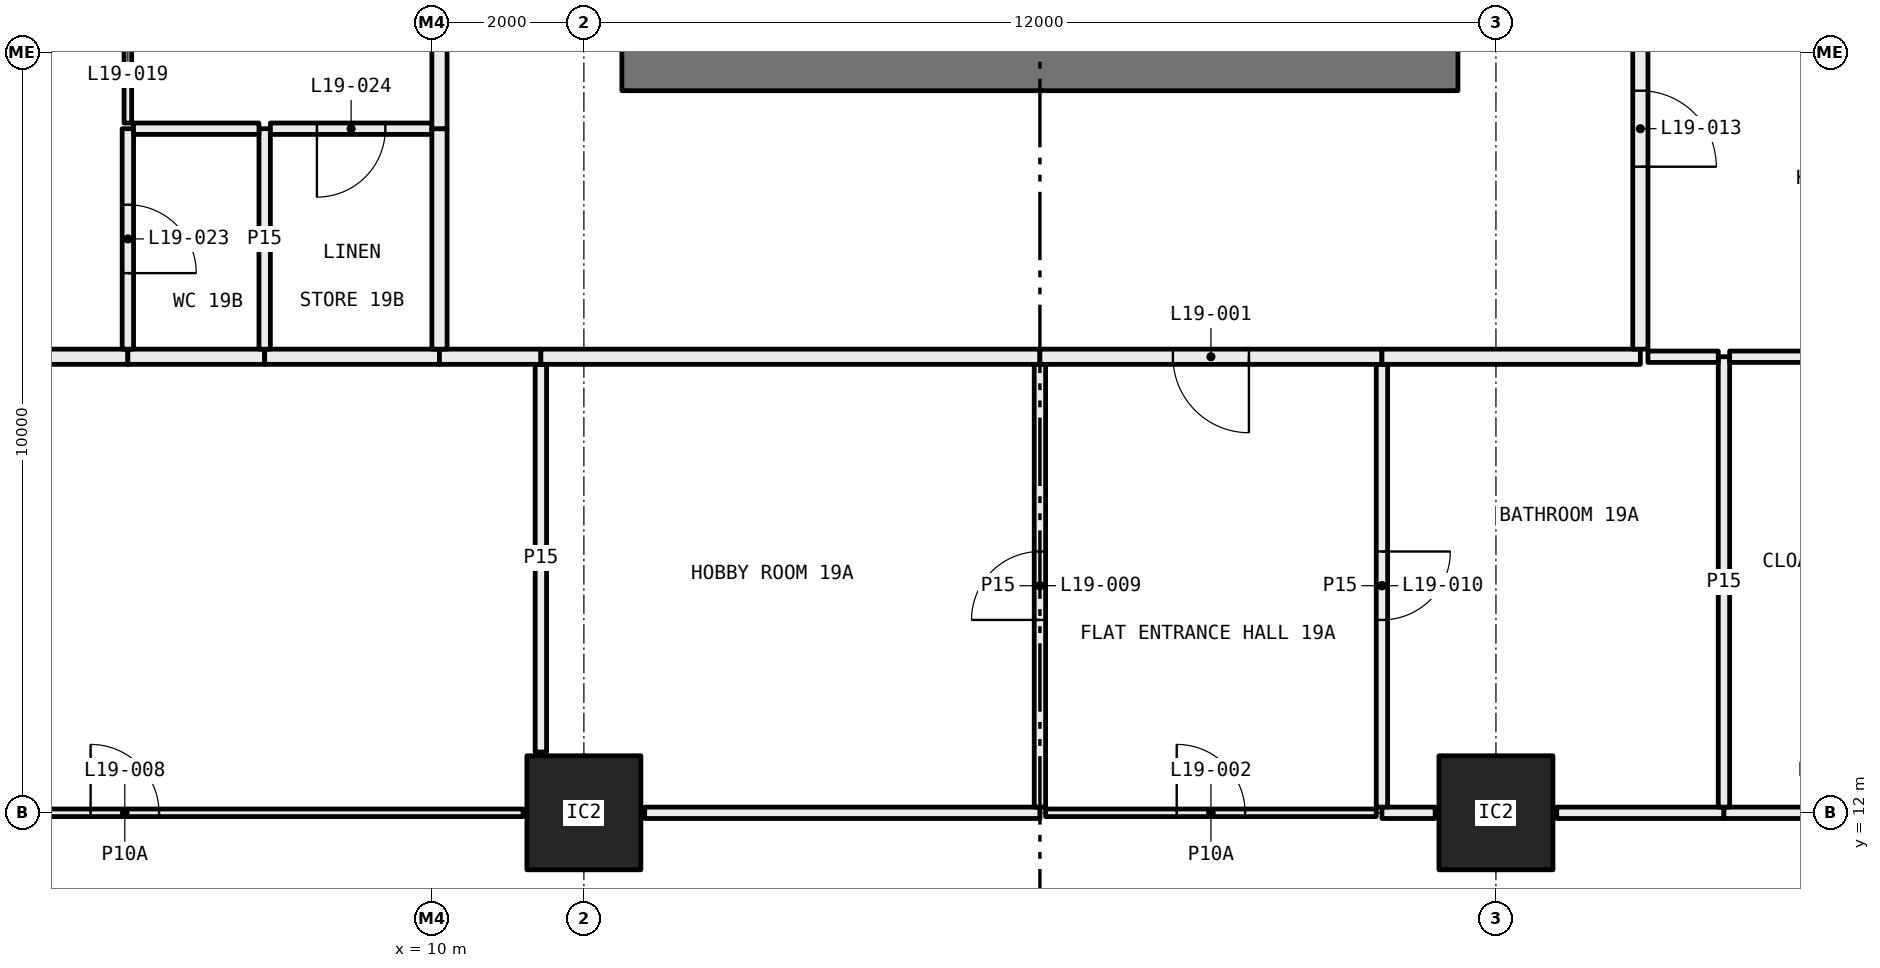
"""IFC4 building model, lengths in metres.
Left out: names, types, materials, properties, quantities, classifications, styles, units other than length and angle.
Written with IfcOpenShell. Run it as: python <this file> out.ifc"""

import sys

from ifc_helpers import new_model, si_unit, direction, frame, frame_2d, origin, origin_2d, place, context, subcontext, project, spatial, rectangle, hollow_rectangle, extrude, element, fill, save


model = new_model("IFC4")
c1 = context("Model", 3, precision=1e-05, world=origin(), true_north=direction((0.0, 1.0)))
c2 = subcontext(c1, "Body", "Model", "MODEL_VIEW")
j1 = project(units=[si_unit("LENGTHUNIT", "METRE"), si_unit("PLANEANGLEUNIT", "RADIAN")], contexts=[c1])
p1 = place(None, origin())
s1 = spatial("IfcSite", under=j1, at=p1, CompositionType="ELEMENT")
p2 = place(p1, origin())
s2 = spatial("IfcBuilding", under=s1, at=p2, CompositionType="ELEMENT")
p3 = place(p2, frame((0.0, 0.0, 78.3)))
s3 = spatial("IfcBuildingStorey", under=s2, at=p3, CompositionType="ELEMENT", Elevation=78.3)
for number, where, z_axis, x_axis in (
    (1, (12.0, 12.0, 0.0), (0.0, 0.0, 1.0), (1.0, 0.0, 0.0)),
    (2, (24.0, 12.0, 0.0), (0.0, 0.0, 1.0), (1.0, 0.0, 0.0)),
):
    element("IfcColumn", number, at=place(p3, frame(where, z_axis=z_axis, x_axis=x_axis)), inside=s3, PredefinedType="COLUMN", context=c2, shape_type="SweptSolid", body=[
        extrude(hollow_rectangle(XDim=1.5, YDim=1.5, WallThickness=0.065, at=origin_2d()), origin(), (0.0, 0.0, 1.0), 3.05),
    ])
p4 = place(p3, frame((11.2, 12.0, 0.0), z_axis=(0.0, 0.0, 1.0), x_axis=(-1.0, 0.0, 0.0)))
e3 = element("IfcWall", 3, at=p4, inside=s3, PredefinedType="PARTITIONING", context=c2, shape_type="SweptSolid", body=[
    extrude(rectangle(XDim=10.48, YDim=0.1, at=frame_2d((5.24, 0.0))), origin(), (0.0, 0.0, 1.0), 2.45),
])
p5 = place(p4, frame((4.79, 0.0, 0.0)))
e4 = element("IfcOpeningElement", 4, at=p5, cuts=e3, PredefinedType="OPENING", context=c2, shape_type="SweptSolid", body=[
    extrude(rectangle(XDim=0.9, YDim=2.1, at=frame_2d((0.45, 1.05))), frame((0.0, 0.06, 0.0), z_axis=(0.0, -1.0, 0.0), x_axis=(1.0, 0.0, 0.0)), (0.0, 0.0, 1.0), 0.12),
])
p6 = place(p3, frame((18.0, 12.0, 0.0), z_axis=(0.0, 0.0, 1.0), x_axis=(-1.0, 0.0, 0.0)))
e5 = element("IfcWall", 5, at=p6, inside=s3, PredefinedType="PARTITIONING", context=c2, shape_type="SweptSolid", body=[
    extrude(rectangle(XDim=5.2, YDim=0.15, at=frame_2d((2.6, 0.0))), origin(), (0.0, 0.0, 1.0), 2.45),
])
p7 = place(p3, frame((22.425, 12.0, 0.0), z_axis=(0.0, 0.0, 1.0), x_axis=(-1.0, 0.0, 0.0)))
e6 = element("IfcWall", 6, at=p7, inside=s3, PredefinedType="PARTITIONING", context=c2, shape_type="SweptSolid", body=[
    extrude(rectangle(XDim=4.35, YDim=0.1, at=frame_2d((2.175, 0.0))), origin(), (0.0, 0.0, 1.0), 2.45),
])
p8 = place(p7, frame((1.725, 0.0, 0.0)))
e7 = element("IfcOpeningElement", 7, at=p8, cuts=e6, PredefinedType="OPENING", context=c2, shape_type="SweptSolid", body=[
    extrude(rectangle(XDim=0.9, YDim=2.1, at=frame_2d((0.45, 1.05))), frame((0.0, 0.06, 0.0), z_axis=(0.0, -1.0, 0.0), x_axis=(1.0, 0.0, 0.0)), (0.0, 0.0, 1.0), 0.12),
])
p9 = place(p3, frame((23.2, 12.0, 0.0), z_axis=(0.0, 0.0, 1.0), x_axis=(-1.0, 0.0, 0.0)))
e8 = element("IfcWall", 8, at=p9, inside=s3, PredefinedType="PARTITIONING", context=c2, shape_type="SweptSolid", body=[
    extrude(rectangle(XDim=0.7, YDim=0.15, at=frame_2d((0.35, 0.0))), origin(), (0.0, 0.0, 1.0), 2.45),
])
p10 = place(p3, frame((27.0, 12.0, 0.0), z_axis=(0.0, 0.0, 1.0), x_axis=(-1.0, 0.0, 0.0)))
e9 = element("IfcWall", 9, at=p10, inside=s3, PredefinedType="PARTITIONING", context=c2, shape_type="SweptSolid", body=[
    extrude(rectangle(XDim=2.2, YDim=0.15, at=frame_2d((1.1, 0.0))), origin(), (0.0, 0.0, 1.0), 2.45),
])
p11 = place(p3, frame((30.0, 12.0, 0.0), z_axis=(0.0, 0.0, 1.0), x_axis=(-1.0, 0.0, 0.0)))
e10 = element("IfcWall", 10, at=p11, inside=s3, PredefinedType="PARTITIONING", context=c2, shape_type="SweptSolid", body=[
    extrude(rectangle(XDim=3.0, YDim=0.15, at=frame_2d((1.5, 0.0))), origin(), (0.0, 0.0, 1.0), 2.45),
])
p12 = place(p11, frame((1.05, 0.0, 0.0)))
e11 = element("IfcOpeningElement", 11, at=p12, cuts=e10, PredefinedType="OPENING", context=c2, shape_type="SweptSolid", body=[
    extrude(rectangle(XDim=0.9, YDim=2.1, at=frame_2d((0.45, 1.05))), frame((0.0, 0.085, 0.0), z_axis=(0.0, -1.0, 0.0), x_axis=(1.0, 0.0, 0.0)), (0.0, 0.0, 1.0), 0.17),
])
p13 = place(p3, frame((11.434, 12.8, 0.0), z_axis=(0.0, 0.0, 1.0), x_axis=(0.0, 1.0, 0.0)))
e12 = element("IfcWall", 12, at=p13, inside=s3, PredefinedType="PARTITIONING", context=c2, shape_type="SweptSolid", body=[
    extrude(rectangle(XDim=5.1, YDim=0.15, at=frame_2d((2.55, 0.0))), origin(), (0.0, 0.0, 1.0), 3.05),
])
p14 = place(p3, frame((6.0, 18.0, 0.0), z_axis=(0.0, 0.0, 1.0), x_axis=(-1.0, 0.0, 0.0)))
e13 = element("IfcWall", 13, at=p14, inside=s3, PredefinedType="PARTITIONING", context=c2, shape_type="SweptSolid", body=[
    extrude(rectangle(XDim=5.28, YDim=0.2, at=frame_2d((2.64, 0.0))), origin(), (0.0, 0.0, 1.0), 3.05),
])
p15 = place(p3, frame((7.8, 18.0, 0.0), z_axis=(0.0, 0.0, 1.0), x_axis=(-1.0, 0.0, 0.0)))
e14 = element("IfcWall", 14, at=p15, inside=s3, PredefinedType="PARTITIONING", context=c2, shape_type="SweptSolid", body=[
    extrude(rectangle(XDim=1.8, YDim=0.2, at=frame_2d((0.9, 0.0))), origin(), (0.0, 0.0, 1.0), 3.05),
])
p16 = place(p3, frame((10.1, 18.0, 0.0), z_axis=(0.0, 0.0, 1.0), x_axis=(-1.0, 0.0, 0.0)))
e15 = element("IfcWall", 15, at=p16, inside=s3, PredefinedType="PARTITIONING", context=c2, shape_type="SweptSolid", body=[
    extrude(rectangle(XDim=2.3, YDim=0.2, at=frame_2d((1.15, 0.0))), origin(), (0.0, 0.0, 1.0), 3.05),
])
p17 = place(p3, frame((11.434, 18.0, 0.0), z_axis=(0.0, 0.0, 1.0), x_axis=(-1.0, 0.0, 0.0)))
e16 = element("IfcWall", 16, at=p17, inside=s3, PredefinedType="PARTITIONING", context=c2, shape_type="SweptSolid", body=[
    extrude(rectangle(XDim=1.334, YDim=0.2, at=frame_2d((0.667, 0.0))), origin(), (0.0, 0.0, 1.0), 3.05),
])
p18 = place(p3, frame((18.0, 12.075, 0.0), z_axis=(0.0, 0.0, 1.0), x_axis=(0.0, 1.0, 0.0)))
e17 = element("IfcWall", 17, at=p18, inside=s3, PredefinedType="PARTITIONING", context=c2, shape_type="SweptSolid", body=[
    extrude(rectangle(XDim=5.825, YDim=0.15, at=frame_2d((2.913, 0.0))), origin(), (0.0, 0.0, 1.0), 2.45),
])
p19 = place(p18, frame((2.462, 0.0, 0.0)))
e18 = element("IfcOpeningElement", 18, at=p19, cuts=e17, PredefinedType="OPENING", context=c2, shape_type="SweptSolid", body=[
    extrude(rectangle(XDim=0.9, YDim=2.1, at=frame_2d((0.45, 1.05))), frame((0.0, 0.085, 0.0), z_axis=(0.0, -1.0, 0.0), x_axis=(1.0, 0.0, 0.0)), (0.0, 0.0, 1.0), 0.17),
])
p20 = place(p3, frame((18.0, 18.0, 0.0), z_axis=(0.0, 0.0, 1.0), x_axis=(-1.0, 0.0, 0.0)))
e19 = element("IfcWall", 19, at=p20, inside=s3, PredefinedType="PARTITIONING", context=c2, shape_type="SweptSolid", body=[
    extrude(rectangle(XDim=6.566, YDim=0.2, at=frame_2d((3.283, 0.0))), origin(), (0.0, 0.0, 1.0), 3.05),
])
p21 = place(p3, frame((22.5, 12.075, 0.0), z_axis=(0.0, 0.0, 1.0), x_axis=(0.0, 1.0, 0.0)))
e20 = element("IfcWall", 20, at=p21, inside=s3, PredefinedType="PARTITIONING", context=c2, shape_type="SweptSolid", body=[
    extrude(rectangle(XDim=5.825, YDim=0.15, at=frame_2d((2.913, 0.0))), origin(), (0.0, 0.0, 1.0), 2.45),
])
p22 = place(p21, frame((2.462, 0.0, 0.0)))
e21 = element("IfcOpeningElement", 21, at=p22, cuts=e20, PredefinedType="OPENING", context=c2, shape_type="SweptSolid", body=[
    extrude(rectangle(XDim=0.9, YDim=2.1, at=frame_2d((0.45, 1.05))), frame((0.0, 0.085, 0.0), z_axis=(0.0, -1.0, 0.0), x_axis=(1.0, 0.0, 0.0)), (0.0, 0.0, 1.0), 0.17),
])
p23 = place(p3, frame((22.5, 18.0, 0.0), z_axis=(0.0, 0.0, 1.0), x_axis=(-1.0, 0.0, 0.0)))
e22 = element("IfcWall", 22, at=p23, inside=s3, PredefinedType="PARTITIONING", context=c2, shape_type="SweptSolid", body=[
    extrude(rectangle(XDim=4.5, YDim=0.2, at=frame_2d((2.25, 0.0))), origin(), (0.0, 0.0, 1.0), 3.05),
])
p24 = place(p23, frame((1.75, 0.0, 0.0)))
e23 = element("IfcOpeningElement", 23, at=p24, cuts=e22, PredefinedType="OPENING", context=c2, shape_type="SweptSolid", body=[
    extrude(rectangle(XDim=1.0, YDim=2.1, at=frame_2d((0.5, 1.05))), frame((0.0, 0.11, 0.0), z_axis=(0.0, -1.0, 0.0), x_axis=(1.0, 0.0, 0.0)), (0.0, 0.0, 1.0), 0.22),
])
p25 = place(p3, frame((27.0, 12.075, 0.0), z_axis=(0.0, 0.0, 1.0), x_axis=(0.0, 1.0, 0.0)))
e24 = element("IfcWall", 24, at=p25, inside=s3, PredefinedType="PARTITIONING", context=c2, shape_type="SweptSolid", body=[
    extrude(rectangle(XDim=5.925, YDim=0.15, at=frame_2d((2.962, 0.0))), origin(), (0.0, 0.0, 1.0), 2.45),
])
p26 = place(p3, frame((26.925, 18.0, 0.0), z_axis=(0.0, 0.0, 1.0), x_axis=(-1.0, 0.0, 0.0)))
e25 = element("IfcWall", 25, at=p26, inside=s3, PredefinedType="PARTITIONING", context=c2, shape_type="SweptSolid", body=[
    extrude(rectangle(XDim=0.925, YDim=0.15, at=frame_2d((0.462, 0.0))), origin(), (0.0, 0.0, 1.0), 3.05),
])
p27 = place(p3, frame((25.9, 18.0, 0.0), z_axis=(0.0, 0.0, 1.0), x_axis=(-1.0, 0.0, 0.0)))
e26 = element("IfcWall", 26, at=p27, inside=s3, PredefinedType="PARTITIONING", context=c2, shape_type="SweptSolid", body=[
    extrude(rectangle(XDim=3.4, YDim=0.2, at=frame_2d((1.7, 0.0))), origin(), (0.0, 0.0, 1.0), 3.05),
])
p28 = place(p3, frame((29.925, 18.0, 0.0), z_axis=(0.0, 0.0, 1.0), x_axis=(-1.0, 0.0, 0.0)))
e27 = element("IfcWall", 27, at=p28, inside=s3, PredefinedType="PARTITIONING", context=c2, shape_type="SweptSolid", body=[
    extrude(rectangle(XDim=2.85, YDim=0.15, at=frame_2d((1.425, 0.0))), origin(), (0.0, 0.0, 1.0), 3.05),
])
p29 = place(p3, frame((25.9, 23.9, 0.0), z_axis=(0.0, 0.0, 1.0), x_axis=(0.0, -1.0, 0.0)))
e28 = element("IfcWall", 28, at=p29, inside=s3, PredefinedType="PARTITIONING", context=c2, shape_type="SweptSolid", body=[
    extrude(rectangle(XDim=5.8, YDim=0.2, at=frame_2d((2.9, 0.0))), origin(), (0.0, 0.0, 1.0), 3.05),
])
p30 = place(p29, frame((2.4, 0.0, 0.0)))
e29 = element("IfcOpeningElement", 29, at=p30, cuts=e28, PredefinedType="OPENING", context=c2, shape_type="SweptSolid", body=[
    extrude(rectangle(XDim=1.0, YDim=2.1, at=frame_2d((0.5, 1.05))), frame((0.0, 0.11, 0.0), z_axis=(0.0, -1.0, 0.0), x_axis=(1.0, 0.0, 0.0)), (0.0, 0.0, 1.0), 0.22),
])
p31 = place(p3, frame((6.0, 18.1, 0.0), z_axis=(0.0, 0.0, 1.0), x_axis=(0.0, 1.0, 0.0)))
e30 = element("IfcWall", 30, at=p31, inside=s3, PredefinedType="PARTITIONING", context=c2, shape_type="SweptSolid", body=[
    extrude(rectangle(XDim=2.9, YDim=0.15, at=frame_2d((1.45, 0.0))), origin(), (0.0, 0.0, 1.0), 3.05),
])
p32 = place(p31, frame((1.0, 0.0, 0.0)))
e31 = element("IfcOpeningElement", 31, at=p32, cuts=e30, PredefinedType="OPENING", context=c2, shape_type="SweptSolid", body=[
    extrude(rectangle(XDim=0.9, YDim=2.1, at=frame_2d((0.45, 1.05))), frame((0.0, 0.085, 0.0), z_axis=(0.0, -1.0, 0.0), x_axis=(1.0, 0.0, 0.0)), (0.0, 0.0, 1.0), 0.17),
])
p33 = place(p3, frame((6.0, 21.075, 0.0), z_axis=(0.0, 0.0, 1.0), x_axis=(0.0, 1.0, 0.0)))
e32 = element("IfcWall", 32, at=p33, inside=s3, PredefinedType="PARTITIONING", context=c2, shape_type="SweptSolid", body=[
    extrude(rectangle(XDim=2.875, YDim=0.1, at=frame_2d((1.438, 0.0))), origin(), (0.0, 0.0, 1.0), 2.45),
])
p34 = place(p33, frame((0.988, 0.0, 0.0)))
e33 = element("IfcOpeningElement", 33, at=p34, cuts=e32, PredefinedType="OPENING", context=c2, shape_type="SweptSolid", body=[
    extrude(rectangle(XDim=0.9, YDim=2.1, at=frame_2d((0.45, 1.05))), frame((0.0, 0.06, 0.0), z_axis=(0.0, -1.0, 0.0), x_axis=(1.0, 0.0, 0.0)), (0.0, 0.0, 1.0), 0.12),
])
p35 = place(p3, frame((7.8, 18.1, 0.0), z_axis=(0.0, 0.0, 1.0), x_axis=(0.0, 1.0, 0.0)))
e34 = element("IfcWall", 34, at=p35, inside=s3, PredefinedType="PARTITIONING", context=c2, shape_type="SweptSolid", body=[
    extrude(rectangle(XDim=2.9, YDim=0.15, at=frame_2d((1.45, 0.0))), origin(), (0.0, 0.0, 1.0), 3.05),
])
p36 = place(p3, frame((7.725, 21.0, 0.0), z_axis=(0.0, 0.0, 1.0), x_axis=(-1.0, 0.0, 0.0)))
e35 = element("IfcWall", 35, at=p36, inside=s3, PredefinedType="PARTITIONING", context=c2, shape_type="SweptSolid", body=[
    extrude(rectangle(XDim=1.65, YDim=0.15, at=frame_2d((0.825, 0.0))), origin(), (0.0, 0.0, 1.0), 3.05),
])
p37 = place(p3, frame((10.0, 21.0, 0.0), z_axis=(0.0, 0.0, 1.0), x_axis=(-1.0, 0.0, 0.0)))
e36 = element("IfcWall", 36, at=p37, inside=s3, PredefinedType="PARTITIONING", context=c2, shape_type="SweptSolid", body=[
    extrude(rectangle(XDim=2.125, YDim=0.15, at=frame_2d((1.062, 0.0))), origin(), (0.0, 0.0, 1.0), 3.05),
])
p38 = place(p37, frame((0.613, 0.0, 0.0)))
e37 = element("IfcOpeningElement", 37, at=p38, cuts=e36, PredefinedType="OPENING", context=c2, shape_type="SweptSolid", body=[
    extrude(rectangle(XDim=0.9, YDim=2.1, at=frame_2d((0.45, 1.05))), frame((0.0, 0.085, 0.0), z_axis=(0.0, -1.0, 0.0), x_axis=(1.0, 0.0, 0.0)), (0.0, 0.0, 1.0), 0.17),
])
p39 = place(p3, frame((10.1, 18.1, 0.0), z_axis=(0.0, 0.0, 1.0), x_axis=(0.0, 1.0, 0.0)))
e38 = element("IfcWall", 38, at=p39, inside=s3, PredefinedType="PARTITIONING", context=c2, shape_type="SweptSolid", body=[
    extrude(rectangle(XDim=2.9, YDim=0.2, at=frame_2d((1.45, 0.0))), origin(), (0.0, 0.0, 1.0), 3.05),
])
p40 = place(p3, frame((10.1, 21.0, 0.0), z_axis=(0.0, 0.0, 1.0), x_axis=(0.0, 1.0, 0.0)))
e39 = element("IfcWall", 39, at=p40, inside=s3, PredefinedType="PARTITIONING", context=c2, shape_type="SweptSolid", body=[
    extrude(rectangle(XDim=3.1, YDim=0.2, at=frame_2d((1.55, 0.0))), origin(), (0.0, 0.0, 1.0), 2.45),
])
p41 = place(p40, frame((1.05, 0.0, 0.0)))
e40 = element("IfcOpeningElement", 40, at=p41, cuts=e39, PredefinedType="OPENING", context=c2, shape_type="SweptSolid", body=[
    extrude(rectangle(XDim=1.0, YDim=2.1, at=frame_2d((0.5, 1.05))), frame((0.0, 0.11, 0.0), z_axis=(0.0, -1.0, 0.0), x_axis=(1.0, 0.0, 0.0)), (0.0, 0.0, 1.0), 0.22),
])
p42 = place(p3, frame((12.5, 21.9, 0.0), z_axis=(0.0, 0.0, 1.0), x_axis=(1.0, 0.0, 0.0)))
e41 = element("IfcWall", 41, at=p42, inside=s3, PredefinedType="SHEAR", context=c2, shape_type="SweptSolid", body=[
    extrude(rectangle(XDim=11.0, YDim=0.8, at=frame_2d((5.5, 0.0))), origin(), (0.0, 0.0, 1.0), 3.05),
])
p43 = place(p24, origin())
e42 = element("IfcDoor", 42, at=p43, inside=s3, OperationType="SINGLE_SWING_RIGHT", PredefinedType="DOOR", context=c2, shape_type="SweptSolid", body=[
    extrude(rectangle(XDim=1.0, YDim=2.1, at=frame_2d((0.5, 1.05))), frame((0.0, 0.025, 0.0), z_axis=(0.0, -1.0, 0.0), x_axis=(1.0, 0.0, 0.0)), (0.0, 0.0, 1.0), 0.05),
])
fill(e23, e42)
p44 = place(p8, frame((0.9, 0.0, 0.0), x_axis=(-1.0, 0.0, 0.0)))
e43 = element("IfcDoor", 43, at=p44, inside=s3, OperationType="SINGLE_SWING_RIGHT", PredefinedType="DOOR", context=c2, shape_type="SweptSolid", body=[
    extrude(rectangle(XDim=0.9, YDim=2.1, at=frame_2d((0.45, 1.05))), frame((0.0, 0.025, 0.0), z_axis=(0.0, -1.0, 0.0), x_axis=(1.0, 0.0, 0.0)), (0.0, 0.0, 1.0), 0.05),
])
fill(e7, e43)
p45 = place(p5, frame((0.9, 0.0, 0.0), x_axis=(-1.0, 0.0, 0.0)))
e44 = element("IfcDoor", 44, at=p45, inside=s3, OperationType="SINGLE_SWING_RIGHT", PredefinedType="DOOR", context=c2, shape_type="SweptSolid", body=[
    extrude(rectangle(XDim=0.9, YDim=2.1, at=frame_2d((0.45, 1.05))), frame((0.0, 0.025, 0.0), z_axis=(0.0, -1.0, 0.0), x_axis=(1.0, 0.0, 0.0)), (0.0, 0.0, 1.0), 0.05),
])
fill(e4, e44)
p46 = place(p19, origin())
e45 = element("IfcDoor", 45, at=p46, inside=s3, OperationType="SINGLE_SWING_RIGHT", PredefinedType="DOOR", context=c2, shape_type="SweptSolid", body=[
    extrude(rectangle(XDim=0.9, YDim=2.1, at=frame_2d((0.45, 1.05))), frame((0.0, 0.025, 0.0), z_axis=(0.0, -1.0, 0.0), x_axis=(1.0, 0.0, 0.0)), (0.0, 0.0, 1.0), 0.05),
])
fill(e18, e45)
p47 = place(p22, frame((0.9, 0.0, 0.0), x_axis=(-1.0, 0.0, 0.0)))
e46 = element("IfcDoor", 46, at=p47, inside=s3, OperationType="SINGLE_SWING_RIGHT", PredefinedType="DOOR", context=c2, shape_type="SweptSolid", body=[
    extrude(rectangle(XDim=0.9, YDim=2.1, at=frame_2d((0.45, 1.05))), frame((0.0, 0.025, 0.0), z_axis=(0.0, -1.0, 0.0), x_axis=(1.0, 0.0, 0.0)), (0.0, 0.0, 1.0), 0.05),
])
fill(e21, e46)
p48 = place(p30, origin())
e47 = element("IfcDoor", 47, at=p48, inside=s3, OperationType="SINGLE_SWING_LEFT", PredefinedType="DOOR", context=c2, shape_type="SweptSolid", body=[
    extrude(rectangle(XDim=1.0, YDim=2.1, at=frame_2d((0.5, 1.05))), frame((0.0, 0.025, 0.0), z_axis=(0.0, -1.0, 0.0), x_axis=(1.0, 0.0, 0.0)), (0.0, 0.0, 1.0), 0.05),
])
fill(e29, e47)
p49 = place(p32, frame((0.9, 0.0, 0.0), x_axis=(-1.0, 0.0, 0.0)))
e48 = element("IfcDoor", 48, at=p49, inside=s3, OperationType="SINGLE_SWING_LEFT", PredefinedType="DOOR", context=c2, shape_type="SweptSolid", body=[
    extrude(rectangle(XDim=0.9, YDim=2.1, at=frame_2d((0.45, 1.05))), frame((0.0, 0.025, 0.0), z_axis=(0.0, -1.0, 0.0), x_axis=(1.0, 0.0, 0.0)), (0.0, 0.0, 1.0), 0.05),
])
fill(e31, e48)
p50 = place(p38, origin())
e49 = element("IfcDoor", 49, at=p50, inside=s3, OperationType="SINGLE_SWING_LEFT", PredefinedType="DOOR", context=c2, shape_type="SweptSolid", body=[
    extrude(rectangle(XDim=0.9, YDim=2.1, at=frame_2d((0.45, 1.05))), frame((0.0, 0.025, 0.0), z_axis=(0.0, -1.0, 0.0), x_axis=(1.0, 0.0, 0.0)), (0.0, 0.0, 1.0), 0.05),
])
fill(e37, e49)
save(model, sys.argv[1])
